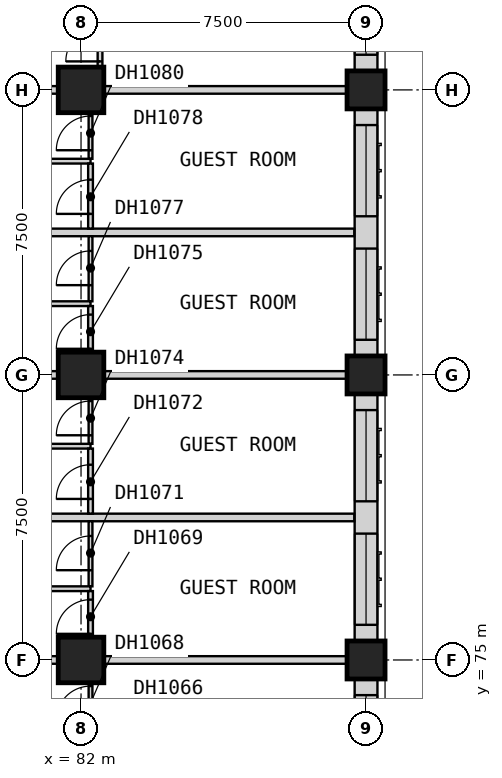
"""IFC4 building model, lengths in metres.
Left out: names, types, materials, properties, quantities, classifications, styles, units other than length and angle.
Written with IfcOpenShell. Run it as: python <this file> out.ifc"""

import sys

from ifc_helpers import new_model, si_unit, direction, frame, frame_2d, origin, origin_2d, place, context, subcontext, project, spatial, rectangle, extrude, element, fill, save


model = new_model("IFC4")
c1 = context("Model", 3, precision=1e-05, world=origin(), true_north=direction((0.0, 1.0)))
c2 = subcontext(c1, "Body", "Model", "MODEL_VIEW")
j1 = project(units=[si_unit("LENGTHUNIT", "METRE"), si_unit("PLANEANGLEUNIT", "RADIAN")], contexts=[c1])
p1 = place(None, origin())
s1 = spatial("IfcSite", under=j1, at=p1, CompositionType="ELEMENT")
p2 = place(p1, origin())
s2 = spatial("IfcBuilding", under=s1, at=p2, CompositionType="ELEMENT")
p3 = place(p2, frame((0.0, 0.0, 48.4)))
s3 = spatial("IfcBuildingStorey", under=s2, at=p3, CompositionType="ELEMENT", Elevation=48.4)
for number, where, z_axis, x_axis in (
    (1, (82.0, 75.0, 0.0), (0.0, 0.0, 1.0), (1.0, 0.0, 0.0)),
    (2, (82.0, 82.5, 0.0), (0.0, 0.0, 1.0), (1.0, 0.0, 0.0)),
    (3, (82.0, 90.0, 0.0), (0.0, 0.0, 1.0), (1.0, 0.0, 0.0)),
):
    element("IfcColumn", number, at=place(p3, frame(where, z_axis=z_axis, x_axis=x_axis)), inside=s3, PredefinedType="COLUMN", context=c2, shape_type="SweptSolid", body=[
        extrude(rectangle(XDim=1.2, YDim=1.2, at=origin_2d()), origin(), (0.0, 0.0, 1.0), 3.6),
    ])
for number, where, z_axis, x_axis in (
    (4, (89.5, 75.0, 0.0), (0.0, 0.0, 1.0), (1.0, 0.0, 0.0)),
    (5, (89.5, 82.5, 0.0), (0.0, 0.0, 1.0), (1.0, 0.0, 0.0)),
    (6, (89.5, 90.0, 0.0), (0.0, 0.0, 1.0), (1.0, 0.0, 0.0)),
):
    element("IfcColumn", number, at=place(p3, frame(where, z_axis=z_axis, x_axis=x_axis)), inside=s3, PredefinedType="COLUMN", context=c2, shape_type="SweptSolid", body=[
        extrude(rectangle(XDim=1.0, YDim=1.0, at=origin_2d()), origin(), (0.0, 0.0, 1.0), 3.6),
    ])
p4 = place(p3, frame((89.5, 68.0, 0.0), z_axis=(0.0, 0.0, 1.0), x_axis=(0.0, 1.0, 0.0)))
e7 = element("IfcWall", 7, at=p4, inside=s3, PredefinedType="SOLIDWALL", context=c2, shape_type="SweptSolid", body=[
    extrude(rectangle(XDim=6.5, YDim=0.6, at=frame_2d((3.25, 0.0))), origin(), (0.0, 0.0, 1.0), 2.85),
])
p5 = place(p4, frame((0.425, 0.0, 0.8)))
e8 = element("IfcOpeningElement", 8, at=p5, cuts=e7, PredefinedType="OPENING", context=c2, shape_type="SweptSolid", body=[
    extrude(rectangle(XDim=2.4, YDim=1.8, at=frame_2d((1.2, 0.9))), frame((0.0, 0.31, 0.0), z_axis=(0.0, -1.0, 0.0), x_axis=(1.0, 0.0, 0.0)), (0.0, 0.0, 1.0), 0.62),
])
p6 = place(p4, frame((3.675, 0.0, 0.8)))
e9 = element("IfcOpeningElement", 9, at=p6, cuts=e7, PredefinedType="OPENING", context=c2, shape_type="SweptSolid", body=[
    extrude(rectangle(XDim=2.4, YDim=1.8, at=frame_2d((1.2, 0.9))), frame((0.0, 0.31, 0.0), z_axis=(0.0, -1.0, 0.0), x_axis=(1.0, 0.0, 0.0)), (0.0, 0.0, 1.0), 0.62),
])
p7 = place(p3, frame((89.5, 75.5, 0.0), z_axis=(0.0, 0.0, 1.0), x_axis=(0.0, 1.0, 0.0)))
e10 = element("IfcWall", 10, at=p7, inside=s3, PredefinedType="SOLIDWALL", context=c2, shape_type="SweptSolid", body=[
    extrude(rectangle(XDim=6.5, YDim=0.6, at=frame_2d((3.25, 0.0))), origin(), (0.0, 0.0, 1.0), 2.85),
])
p8 = place(p7, frame((0.425, 0.0, 0.8)))
e11 = element("IfcOpeningElement", 11, at=p8, cuts=e10, PredefinedType="OPENING", context=c2, shape_type="SweptSolid", body=[
    extrude(rectangle(XDim=2.4, YDim=1.8, at=frame_2d((1.2, 0.9))), frame((0.0, 0.31, 0.0), z_axis=(0.0, -1.0, 0.0), x_axis=(1.0, 0.0, 0.0)), (0.0, 0.0, 1.0), 0.62),
])
p9 = place(p7, frame((3.675, 0.0, 0.8)))
e12 = element("IfcOpeningElement", 12, at=p9, cuts=e10, PredefinedType="OPENING", context=c2, shape_type="SweptSolid", body=[
    extrude(rectangle(XDim=2.4, YDim=1.8, at=frame_2d((1.2, 0.9))), frame((0.0, 0.31, 0.0), z_axis=(0.0, -1.0, 0.0), x_axis=(1.0, 0.0, 0.0)), (0.0, 0.0, 1.0), 0.62),
])
p10 = place(p3, frame((89.5, 83.0, 0.0), z_axis=(0.0, 0.0, 1.0), x_axis=(0.0, 1.0, 0.0)))
e13 = element("IfcWall", 13, at=p10, inside=s3, PredefinedType="SOLIDWALL", context=c2, shape_type="SweptSolid", body=[
    extrude(rectangle(XDim=6.5, YDim=0.6, at=frame_2d((3.25, 0.0))), origin(), (0.0, 0.0, 1.0), 2.85),
])
p11 = place(p10, frame((0.425, 0.0, 0.8)))
e14 = element("IfcOpeningElement", 14, at=p11, cuts=e13, PredefinedType="OPENING", context=c2, shape_type="SweptSolid", body=[
    extrude(rectangle(XDim=2.4, YDim=1.8, at=frame_2d((1.2, 0.9))), frame((0.0, 0.31, 0.0), z_axis=(0.0, -1.0, 0.0), x_axis=(1.0, 0.0, 0.0)), (0.0, 0.0, 1.0), 0.62),
])
p12 = place(p10, frame((3.675, 0.0, 0.8)))
e15 = element("IfcOpeningElement", 15, at=p12, cuts=e13, PredefinedType="OPENING", context=c2, shape_type="SweptSolid", body=[
    extrude(rectangle(XDim=2.4, YDim=1.8, at=frame_2d((1.2, 0.9))), frame((0.0, 0.31, 0.0), z_axis=(0.0, -1.0, 0.0), x_axis=(1.0, 0.0, 0.0)), (0.0, 0.0, 1.0), 0.62),
])
p13 = place(p3, frame((89.5, 90.5, 0.0), z_axis=(0.0, 0.0, 1.0), x_axis=(0.0, 1.0, 0.0)))
e16 = element("IfcWall", 16, at=p13, inside=s3, PredefinedType="SOLIDWALL", context=c2, shape_type="SweptSolid", body=[
    extrude(rectangle(XDim=6.0, YDim=0.6, at=frame_2d((3.0, 0.0))), origin(), (0.0, 0.0, 1.0), 2.85),
])
p14 = place(p13, frame((0.425, 0.0, 0.8)))
e17 = element("IfcOpeningElement", 17, at=p14, cuts=e16, PredefinedType="OPENING", context=c2, shape_type="SweptSolid", body=[
    extrude(rectangle(XDim=2.4, YDim=1.8, at=frame_2d((1.2, 0.9))), frame((0.0, 0.31, 0.0), z_axis=(0.0, -1.0, 0.0), x_axis=(1.0, 0.0, 0.0)), (0.0, 0.0, 1.0), 0.62),
])
p15 = place(p13, frame((3.425, 0.0, 0.8)))
e18 = element("IfcOpeningElement", 18, at=p15, cuts=e16, PredefinedType="OPENING", context=c2, shape_type="SweptSolid", body=[
    extrude(rectangle(XDim=2.4, YDim=1.8, at=frame_2d((1.2, 0.9))), frame((0.0, 0.31, 0.0), z_axis=(0.0, -1.0, 0.0), x_axis=(1.0, 0.0, 0.0)), (0.0, 0.0, 1.0), 0.62),
])
p16 = place(p3, frame((77.475, 75.0, 0.0), z_axis=(0.0, 0.0, 1.0), x_axis=(1.0, 0.0, 0.0)))
e19 = element("IfcWall", 19, at=p16, inside=s3, PredefinedType="PARTITIONING", context=c2, shape_type="SweptSolid", body=[
    extrude(rectangle(XDim=12.525, YDim=0.2, at=frame_2d((6.262, 0.0))), origin(), (0.0, 0.0, 1.0), 3.35),
])
p17 = place(p3, frame((77.475, 78.75, 0.0), z_axis=(0.0, 0.0, 1.0), x_axis=(1.0, 0.0, 0.0)))
e20 = element("IfcWall", 20, at=p17, inside=s3, PredefinedType="PARTITIONING", context=c2, shape_type="SweptSolid", body=[
    extrude(rectangle(XDim=11.715, YDim=0.2, at=frame_2d((5.857, 0.0))), origin(), (0.0, 0.0, 1.0), 3.35),
])
p18 = place(p3, frame((77.475, 82.5, 0.0), z_axis=(0.0, 0.0, 1.0), x_axis=(1.0, 0.0, 0.0)))
e21 = element("IfcWall", 21, at=p18, inside=s3, PredefinedType="PARTITIONING", context=c2, shape_type="SweptSolid", body=[
    extrude(rectangle(XDim=12.525, YDim=0.2, at=frame_2d((6.262, 0.0))), origin(), (0.0, 0.0, 1.0), 3.35),
])
p19 = place(p3, frame((77.475, 86.25, 0.0), z_axis=(0.0, 0.0, 1.0), x_axis=(1.0, 0.0, 0.0)))
e22 = element("IfcWall", 22, at=p19, inside=s3, PredefinedType="PARTITIONING", context=c2, shape_type="SweptSolid", body=[
    extrude(rectangle(XDim=11.715, YDim=0.2, at=frame_2d((5.857, 0.0))), origin(), (0.0, 0.0, 1.0), 3.35),
])
p20 = place(p3, frame((77.475, 90.0, 0.0), z_axis=(0.0, 0.0, 1.0), x_axis=(1.0, 0.0, 0.0)))
e23 = element("IfcWall", 23, at=p20, inside=s3, PredefinedType="PARTITIONING", context=c2, shape_type="SweptSolid", body=[
    extrude(rectangle(XDim=12.525, YDim=0.2, at=frame_2d((6.262, 0.0))), origin(), (0.0, 0.0, 1.0), 3.35),
])
p21 = place(p3, frame((82.25, 73.188, 0.0), z_axis=(0.0, 0.0, 1.0), x_axis=(0.0, 1.0, 0.0)))
e24 = element("IfcWall", 24, at=p21, inside=s3, PredefinedType="PARTITIONING", context=c2, shape_type="SweptSolid", body=[
    extrude(rectangle(XDim=1.712, YDim=0.1, at=frame_2d((0.856, 0.0))), origin(), (0.0, 0.0, 1.0), 3.35),
])
p22 = place(p21, frame((0.225, 0.0, 0.0)))
e25 = element("IfcOpeningElement", 25, at=p22, cuts=e24, PredefinedType="OPENING", context=c2, shape_type="SweptSolid", body=[
    extrude(rectangle(XDim=0.9, YDim=2.1, at=frame_2d((0.45, 1.05))), frame((0.0, 0.06, 0.0), z_axis=(0.0, -1.0, 0.0), x_axis=(1.0, 0.0, 0.0)), (0.0, 0.0, 1.0), 0.12),
])
p23 = place(p3, frame((82.25, 76.938, 0.0), z_axis=(0.0, 0.0, 1.0), x_axis=(0.0, 1.0, 0.0)))
e26 = element("IfcWall", 26, at=p23, inside=s3, PredefinedType="PARTITIONING", context=c2, shape_type="SweptSolid", body=[
    extrude(rectangle(XDim=1.712, YDim=0.1, at=frame_2d((0.856, 0.0))), origin(), (0.0, 0.0, 1.0), 3.35),
])
p24 = place(p23, frame((0.425, 0.0, 0.0)))
e27 = element("IfcOpeningElement", 27, at=p24, cuts=e26, PredefinedType="OPENING", context=c2, shape_type="SweptSolid", body=[
    extrude(rectangle(XDim=0.9, YDim=2.1, at=frame_2d((0.45, 1.05))), frame((0.0, 0.06, 0.0), z_axis=(0.0, -1.0, 0.0), x_axis=(1.0, 0.0, 0.0)), (0.0, 0.0, 1.0), 0.12),
])
p25 = place(p3, frame((82.25, 80.688, 0.0), z_axis=(0.0, 0.0, 1.0), x_axis=(0.0, 1.0, 0.0)))
e28 = element("IfcWall", 28, at=p25, inside=s3, PredefinedType="PARTITIONING", context=c2, shape_type="SweptSolid", body=[
    extrude(rectangle(XDim=1.712, YDim=0.1, at=frame_2d((0.856, 0.0))), origin(), (0.0, 0.0, 1.0), 3.35),
])
p26 = place(p25, frame((0.225, 0.0, 0.0)))
e29 = element("IfcOpeningElement", 29, at=p26, cuts=e28, PredefinedType="OPENING", context=c2, shape_type="SweptSolid", body=[
    extrude(rectangle(XDim=0.9, YDim=2.1, at=frame_2d((0.45, 1.05))), frame((0.0, 0.06, 0.0), z_axis=(0.0, -1.0, 0.0), x_axis=(1.0, 0.0, 0.0)), (0.0, 0.0, 1.0), 0.12),
])
p27 = place(p3, frame((82.25, 84.438, 0.0), z_axis=(0.0, 0.0, 1.0), x_axis=(0.0, 1.0, 0.0)))
e30 = element("IfcWall", 30, at=p27, inside=s3, PredefinedType="PARTITIONING", context=c2, shape_type="SweptSolid", body=[
    extrude(rectangle(XDim=1.712, YDim=0.1, at=frame_2d((0.856, 0.0))), origin(), (0.0, 0.0, 1.0), 3.35),
])
p28 = place(p27, frame((0.425, 0.0, 0.0)))
e31 = element("IfcOpeningElement", 31, at=p28, cuts=e30, PredefinedType="OPENING", context=c2, shape_type="SweptSolid", body=[
    extrude(rectangle(XDim=0.9, YDim=2.1, at=frame_2d((0.45, 1.05))), frame((0.0, 0.06, 0.0), z_axis=(0.0, -1.0, 0.0), x_axis=(1.0, 0.0, 0.0)), (0.0, 0.0, 1.0), 0.12),
])
p29 = place(p3, frame((82.25, 88.188, 0.0), z_axis=(0.0, 0.0, 1.0), x_axis=(0.0, 1.0, 0.0)))
e32 = element("IfcWall", 32, at=p29, inside=s3, PredefinedType="PARTITIONING", context=c2, shape_type="SweptSolid", body=[
    extrude(rectangle(XDim=1.712, YDim=0.1, at=frame_2d((0.856, 0.0))), origin(), (0.0, 0.0, 1.0), 3.35),
])
p30 = place(p29, frame((0.225, 0.0, 0.0)))
e33 = element("IfcOpeningElement", 33, at=p30, cuts=e32, PredefinedType="OPENING", context=c2, shape_type="SweptSolid", body=[
    extrude(rectangle(XDim=0.9, YDim=2.1, at=frame_2d((0.45, 1.05))), frame((0.0, 0.06, 0.0), z_axis=(0.0, -1.0, 0.0), x_axis=(1.0, 0.0, 0.0)), (0.0, 0.0, 1.0), 0.12),
])
for number, where, z_axis, x_axis in (
    (34, (77.475, 76.875, 0.0), (0.0, 0.0, 1.0), (1.0, 0.0, 0.0)),
    (35, (77.475, 80.625, 0.0), (0.0, 0.0, 1.0), (1.0, 0.0, 0.0)),
    (36, (77.475, 84.375, 0.0), (0.0, 0.0, 1.0), (1.0, 0.0, 0.0)),
    (37, (77.475, 88.125, 0.0), (0.0, 0.0, 1.0), (1.0, 0.0, 0.0)),
):
    element("IfcWall", number, at=place(p3, frame(where, z_axis=z_axis, x_axis=x_axis)), inside=s3, PredefinedType="PARTITIONING", context=c2, shape_type="SweptSolid", body=[
        extrude(rectangle(XDim=4.775, YDim=0.125, at=frame_2d((2.387, 0.0))), origin(), (0.0, 0.0, 1.0), 3.35),
    ])
p31 = place(p3, frame((82.25, 75.1, 0.0), z_axis=(0.0, 0.0, 1.0), x_axis=(0.0, 1.0, 0.0)))
e38 = element("IfcWall", 38, at=p31, inside=s3, PredefinedType="PARTITIONING", context=c2, shape_type="SweptSolid", body=[
    extrude(rectangle(XDim=1.712, YDim=0.125, at=frame_2d((0.856, 0.0))), origin(), (0.0, 0.0, 1.0), 3.35),
])
p32 = place(p31, frame((0.587, 0.0, 0.0)))
e39 = element("IfcOpeningElement", 39, at=p32, cuts=e38, PredefinedType="OPENING", context=c2, shape_type="SweptSolid", body=[
    extrude(rectangle(XDim=0.9, YDim=2.1, at=frame_2d((0.45, 1.05))), frame((0.0, 0.073, 0.0), z_axis=(0.0, -1.0, 0.0), x_axis=(1.0, 0.0, 0.0)), (0.0, 0.0, 1.0), 0.145),
])
p33 = place(p3, frame((82.25, 78.85, 0.0), z_axis=(0.0, 0.0, 1.0), x_axis=(0.0, 1.0, 0.0)))
e40 = element("IfcWall", 40, at=p33, inside=s3, PredefinedType="PARTITIONING", context=c2, shape_type="SweptSolid", body=[
    extrude(rectangle(XDim=1.712, YDim=0.125, at=frame_2d((0.856, 0.0))), origin(), (0.0, 0.0, 1.0), 3.35),
])
p34 = place(p33, frame((0.387, 0.0, 0.0)))
e41 = element("IfcOpeningElement", 41, at=p34, cuts=e40, PredefinedType="OPENING", context=c2, shape_type="SweptSolid", body=[
    extrude(rectangle(XDim=0.9, YDim=2.1, at=frame_2d((0.45, 1.05))), frame((0.0, 0.073, 0.0), z_axis=(0.0, -1.0, 0.0), x_axis=(1.0, 0.0, 0.0)), (0.0, 0.0, 1.0), 0.145),
])
p35 = place(p3, frame((82.25, 82.6, 0.0), z_axis=(0.0, 0.0, 1.0), x_axis=(0.0, 1.0, 0.0)))
e42 = element("IfcWall", 42, at=p35, inside=s3, PredefinedType="PARTITIONING", context=c2, shape_type="SweptSolid", body=[
    extrude(rectangle(XDim=1.712, YDim=0.125, at=frame_2d((0.856, 0.0))), origin(), (0.0, 0.0, 1.0), 3.35),
])
p36 = place(p35, frame((0.587, 0.0, 0.0)))
e43 = element("IfcOpeningElement", 43, at=p36, cuts=e42, PredefinedType="OPENING", context=c2, shape_type="SweptSolid", body=[
    extrude(rectangle(XDim=0.9, YDim=2.1, at=frame_2d((0.45, 1.05))), frame((0.0, 0.073, 0.0), z_axis=(0.0, -1.0, 0.0), x_axis=(1.0, 0.0, 0.0)), (0.0, 0.0, 1.0), 0.145),
])
p37 = place(p3, frame((82.25, 86.35, 0.0), z_axis=(0.0, 0.0, 1.0), x_axis=(0.0, 1.0, 0.0)))
e44 = element("IfcWall", 44, at=p37, inside=s3, PredefinedType="PARTITIONING", context=c2, shape_type="SweptSolid", body=[
    extrude(rectangle(XDim=1.712, YDim=0.125, at=frame_2d((0.856, 0.0))), origin(), (0.0, 0.0, 1.0), 3.35),
])
p38 = place(p37, frame((0.387, 0.0, 0.0)))
e45 = element("IfcOpeningElement", 45, at=p38, cuts=e44, PredefinedType="OPENING", context=c2, shape_type="SweptSolid", body=[
    extrude(rectangle(XDim=0.9, YDim=2.1, at=frame_2d((0.45, 1.05))), frame((0.0, 0.073, 0.0), z_axis=(0.0, -1.0, 0.0), x_axis=(1.0, 0.0, 0.0)), (0.0, 0.0, 1.0), 0.145),
])
p39 = place(p3, frame((82.5, 90.1, 0.0), z_axis=(0.0, 0.0, 1.0), x_axis=(0.0, 1.0, 0.0)))
e46 = element("IfcWall", 46, at=p39, inside=s3, PredefinedType="PARTITIONING", context=c2, shape_type="SweptSolid", body=[
    extrude(rectangle(XDim=2.237, YDim=0.125, at=frame_2d((1.119, 0.0))), origin(), (0.0, 0.0, 1.0), 3.35),
])
p40 = place(p39, frame((0.65, 0.0, 0.0)))
e47 = element("IfcOpeningElement", 47, at=p40, cuts=e46, PredefinedType="OPENING", context=c2, shape_type="SweptSolid", body=[
    extrude(rectangle(XDim=0.9, YDim=2.1, at=frame_2d((0.45, 1.05))), frame((0.0, 0.073, 0.0), z_axis=(0.0, -1.0, 0.0), x_axis=(1.0, 0.0, 0.0)), (0.0, 0.0, 1.0), 0.145),
])
p41 = place(p6, origin())
e48 = element("IfcWindow", 48, at=p41, inside=s3, PartitioningType="SINGLE_PANEL", PredefinedType="WINDOW", context=c2, shape_type="SweptSolid", body=[
    extrude(rectangle(XDim=2.4, YDim=1.8, at=frame_2d((1.2, 0.9))), frame((0.0, -0.07, 0.0), z_axis=(0.0, -1.0, 0.0), x_axis=(1.0, 0.0, 0.0)), (0.0, 0.0, 1.0), 0.06),
])
fill(e9, e48)
p42 = place(p8, origin())
e49 = element("IfcWindow", 49, at=p42, inside=s3, PartitioningType="SINGLE_PANEL", PredefinedType="WINDOW", context=c2, shape_type="SweptSolid", body=[
    extrude(rectangle(XDim=2.4, YDim=1.8, at=frame_2d((1.2, 0.9))), frame((0.0, -0.07, 0.0), z_axis=(0.0, -1.0, 0.0), x_axis=(1.0, 0.0, 0.0)), (0.0, 0.0, 1.0), 0.06),
])
fill(e11, e49)
p43 = place(p9, origin())
e50 = element("IfcWindow", 50, at=p43, inside=s3, PartitioningType="SINGLE_PANEL", PredefinedType="WINDOW", context=c2, shape_type="SweptSolid", body=[
    extrude(rectangle(XDim=2.4, YDim=1.8, at=frame_2d((1.2, 0.9))), frame((0.0, -0.07, 0.0), z_axis=(0.0, -1.0, 0.0), x_axis=(1.0, 0.0, 0.0)), (0.0, 0.0, 1.0), 0.06),
])
fill(e12, e50)
p44 = place(p11, origin())
e51 = element("IfcWindow", 51, at=p44, inside=s3, PartitioningType="SINGLE_PANEL", PredefinedType="WINDOW", context=c2, shape_type="SweptSolid", body=[
    extrude(rectangle(XDim=2.4, YDim=1.8, at=frame_2d((1.2, 0.9))), frame((0.0, -0.07, 0.0), z_axis=(0.0, -1.0, 0.0), x_axis=(1.0, 0.0, 0.0)), (0.0, 0.0, 1.0), 0.06),
])
fill(e14, e51)
p45 = place(p12, origin())
e52 = element("IfcWindow", 52, at=p45, inside=s3, PartitioningType="SINGLE_PANEL", PredefinedType="WINDOW", context=c2, shape_type="SweptSolid", body=[
    extrude(rectangle(XDim=2.4, YDim=1.8, at=frame_2d((1.2, 0.9))), frame((0.0, -0.07, 0.0), z_axis=(0.0, -1.0, 0.0), x_axis=(1.0, 0.0, 0.0)), (0.0, 0.0, 1.0), 0.06),
])
fill(e15, e52)
p46 = place(p14, origin())
e53 = element("IfcWindow", 53, at=p46, inside=s3, PartitioningType="SINGLE_PANEL", PredefinedType="WINDOW", context=c2, shape_type="SweptSolid", body=[
    extrude(rectangle(XDim=2.4, YDim=1.8, at=frame_2d((1.2, 0.9))), frame((0.0, -0.07, 0.0), z_axis=(0.0, -1.0, 0.0), x_axis=(1.0, 0.0, 0.0)), (0.0, 0.0, 1.0), 0.06),
])
fill(e17, e53)
p47 = place(p22, origin())
e54 = element("IfcDoor", 54, at=p47, inside=s3, OperationType="SINGLE_SWING_LEFT", PredefinedType="DOOR", context=c2, shape_type="SweptSolid", body=[
    extrude(rectangle(XDim=0.9, YDim=2.1, at=frame_2d((0.45, 1.05))), frame((0.0, 0.025, 0.0), z_axis=(0.0, -1.0, 0.0), x_axis=(1.0, 0.0, 0.0)), (0.0, 0.0, 1.0), 0.05),
])
fill(e25, e54)
p48 = place(p32, origin())
e55 = element("IfcDoor", 55, at=p48, inside=s3, OperationType="SINGLE_SWING_RIGHT", PredefinedType="DOOR", context=c2, shape_type="SweptSolid", body=[
    extrude(rectangle(XDim=0.9, YDim=2.1, at=frame_2d((0.45, 1.05))), frame((0.0, 0.025, 0.0), z_axis=(0.0, -1.0, 0.0), x_axis=(1.0, 0.0, 0.0)), (0.0, 0.0, 1.0), 0.05),
])
fill(e39, e55)
p49 = place(p24, origin())
e56 = element("IfcDoor", 56, at=p49, inside=s3, OperationType="SINGLE_SWING_LEFT", PredefinedType="DOOR", context=c2, shape_type="SweptSolid", body=[
    extrude(rectangle(XDim=0.9, YDim=2.1, at=frame_2d((0.45, 1.05))), frame((0.0, 0.025, 0.0), z_axis=(0.0, -1.0, 0.0), x_axis=(1.0, 0.0, 0.0)), (0.0, 0.0, 1.0), 0.05),
])
fill(e27, e56)
p50 = place(p34, origin())
e57 = element("IfcDoor", 57, at=p50, inside=s3, OperationType="SINGLE_SWING_LEFT", PredefinedType="DOOR", context=c2, shape_type="SweptSolid", body=[
    extrude(rectangle(XDim=0.9, YDim=2.1, at=frame_2d((0.45, 1.05))), frame((0.0, 0.025, 0.0), z_axis=(0.0, -1.0, 0.0), x_axis=(1.0, 0.0, 0.0)), (0.0, 0.0, 1.0), 0.05),
])
fill(e41, e57)
p51 = place(p26, origin())
e58 = element("IfcDoor", 58, at=p51, inside=s3, OperationType="SINGLE_SWING_LEFT", PredefinedType="DOOR", context=c2, shape_type="SweptSolid", body=[
    extrude(rectangle(XDim=0.9, YDim=2.1, at=frame_2d((0.45, 1.05))), frame((0.0, 0.025, 0.0), z_axis=(0.0, -1.0, 0.0), x_axis=(1.0, 0.0, 0.0)), (0.0, 0.0, 1.0), 0.05),
])
fill(e29, e58)
p52 = place(p36, origin())
e59 = element("IfcDoor", 59, at=p52, inside=s3, OperationType="SINGLE_SWING_RIGHT", PredefinedType="DOOR", context=c2, shape_type="SweptSolid", body=[
    extrude(rectangle(XDim=0.9, YDim=2.1, at=frame_2d((0.45, 1.05))), frame((0.0, 0.025, 0.0), z_axis=(0.0, -1.0, 0.0), x_axis=(1.0, 0.0, 0.0)), (0.0, 0.0, 1.0), 0.05),
])
fill(e43, e59)
p53 = place(p28, origin())
e60 = element("IfcDoor", 60, at=p53, inside=s3, OperationType="SINGLE_SWING_LEFT", PredefinedType="DOOR", context=c2, shape_type="SweptSolid", body=[
    extrude(rectangle(XDim=0.9, YDim=2.1, at=frame_2d((0.45, 1.05))), frame((0.0, 0.025, 0.0), z_axis=(0.0, -1.0, 0.0), x_axis=(1.0, 0.0, 0.0)), (0.0, 0.0, 1.0), 0.05),
])
fill(e31, e60)
p54 = place(p38, origin())
e61 = element("IfcDoor", 61, at=p54, inside=s3, OperationType="SINGLE_SWING_LEFT", PredefinedType="DOOR", context=c2, shape_type="SweptSolid", body=[
    extrude(rectangle(XDim=0.9, YDim=2.1, at=frame_2d((0.45, 1.05))), frame((0.0, 0.025, 0.0), z_axis=(0.0, -1.0, 0.0), x_axis=(1.0, 0.0, 0.0)), (0.0, 0.0, 1.0), 0.05),
])
fill(e45, e61)
p55 = place(p30, origin())
e62 = element("IfcDoor", 62, at=p55, inside=s3, OperationType="SINGLE_SWING_LEFT", PredefinedType="DOOR", context=c2, shape_type="SweptSolid", body=[
    extrude(rectangle(XDim=0.9, YDim=2.1, at=frame_2d((0.45, 1.05))), frame((0.0, 0.025, 0.0), z_axis=(0.0, -1.0, 0.0), x_axis=(1.0, 0.0, 0.0)), (0.0, 0.0, 1.0), 0.05),
])
fill(e33, e62)
p56 = place(p40, origin())
e63 = element("IfcDoor", 63, at=p56, inside=s3, OperationType="SINGLE_SWING_LEFT", PredefinedType="DOOR", context=c2, shape_type="SweptSolid", body=[
    extrude(rectangle(XDim=0.9, YDim=2.1, at=frame_2d((0.45, 1.05))), frame((0.0, 0.025, 0.0), z_axis=(0.0, -1.0, 0.0), x_axis=(1.0, 0.0, 0.0)), (0.0, 0.0, 1.0), 0.05),
])
fill(e47, e63)
save(model, sys.argv[1])
